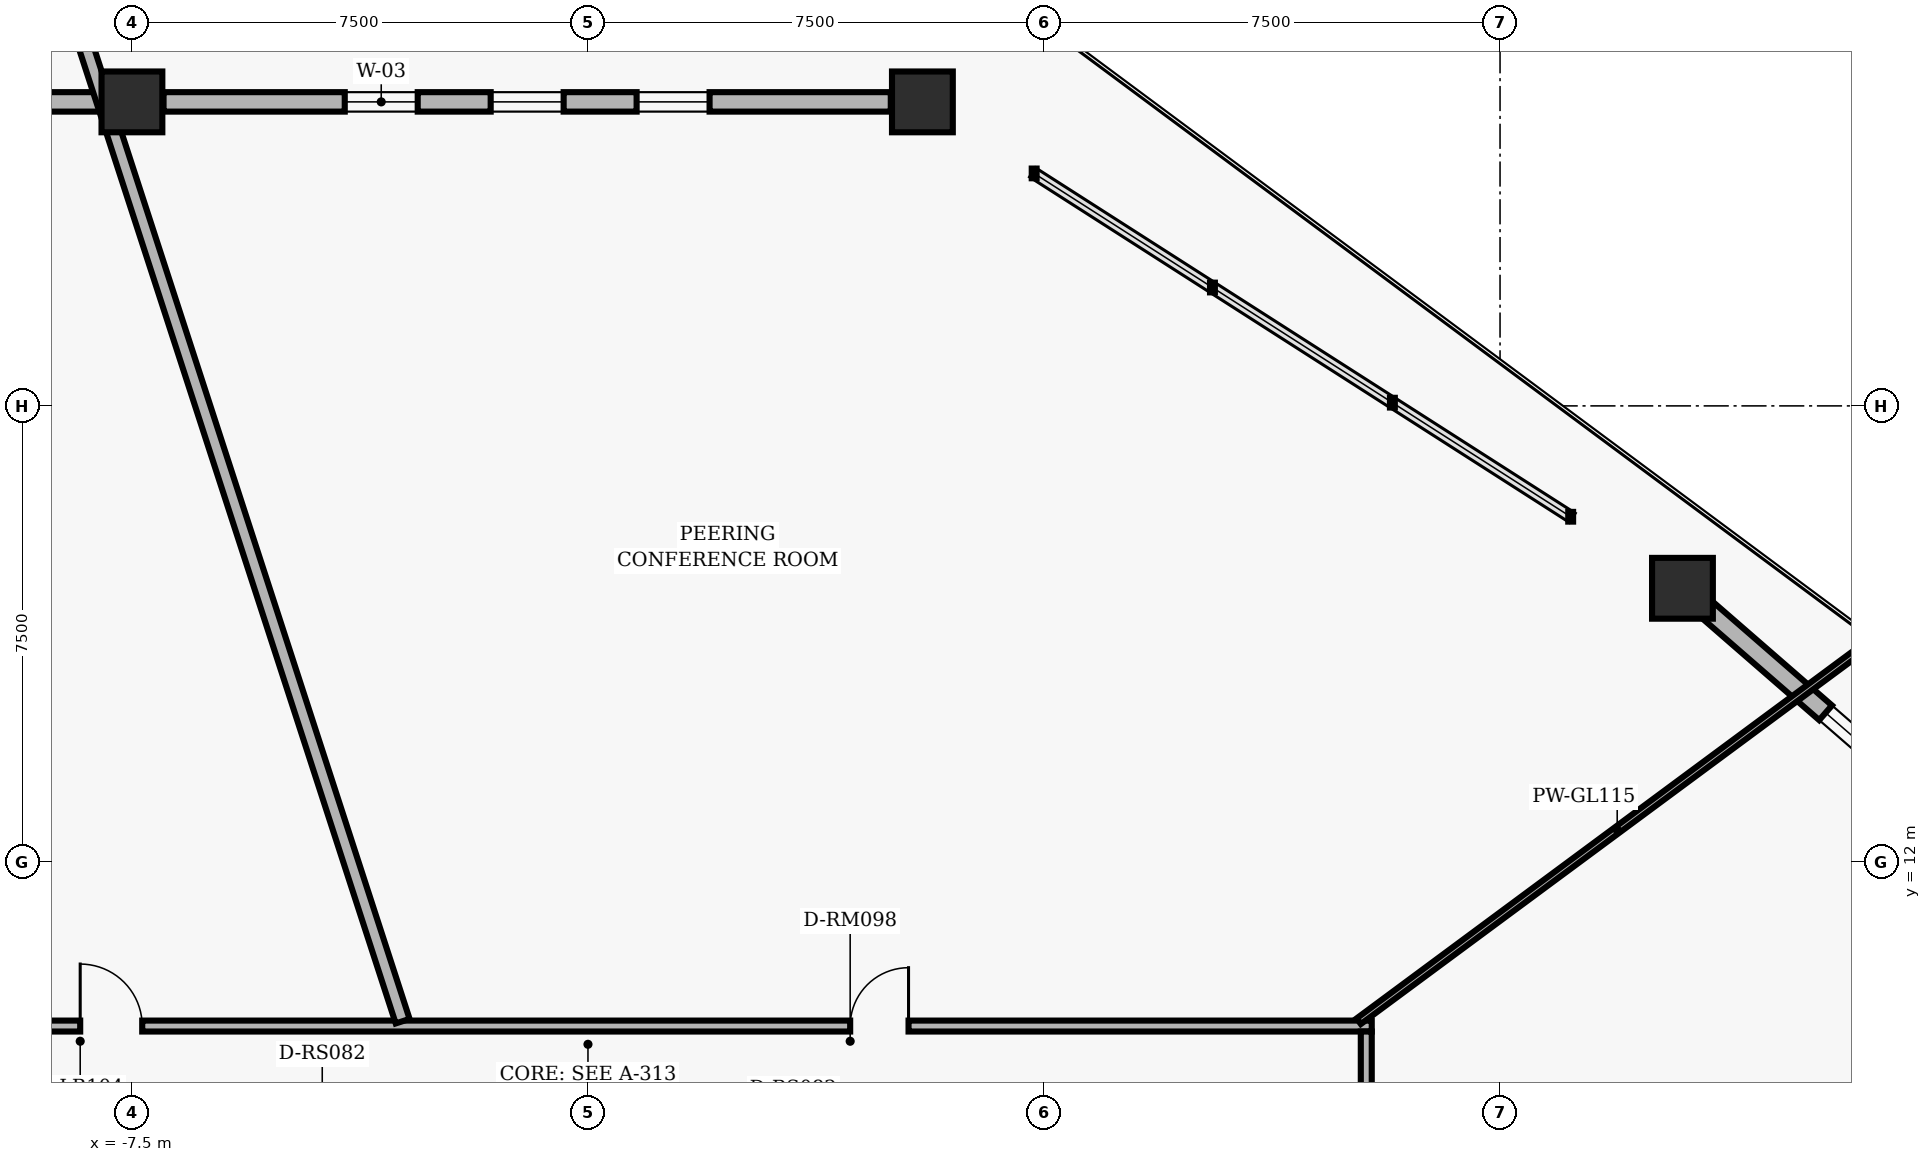
"""IFC4 building model, lengths in metres.
Left out: names, types, materials, properties, quantities, classifications, styles, units other than length and angle.
Written with IfcOpenShell. Run it as: python <this file> out.ifc"""

import sys

from ifc_helpers import new_model, si_unit, direction, frame, frame_2d, origin, origin_2d, place, context, subcontext, project, spatial, rectangle, extrude, element, fill, save


model = new_model("IFC4")
c1 = context("Model", 3, precision=1e-05, world=origin(), true_north=direction((0.0, 1.0)))
c2 = subcontext(c1, "Body", "Model", "MODEL_VIEW")
j1 = project(units=[si_unit("LENGTHUNIT", "METRE"), si_unit("PLANEANGLEUNIT", "RADIAN")], contexts=[c1])
p1 = place(None, origin())
s1 = spatial("IfcSite", under=j1, at=p1, CompositionType="ELEMENT")
p2 = place(p1, origin())
s2 = spatial("IfcBuilding", under=s1, at=p2, CompositionType="ELEMENT")
p3 = place(p2, frame((0.0, 0.0, 11.84)))
s3 = spatial("IfcBuildingStorey", under=s2, at=p3, CompositionType="ELEMENT", Elevation=11.84)
for number, where, z_axis, x_axis in (
    (1, (18.0, 16.5, 0.0), (0.0, 0.0, 1.0), (1.0, 0.0, 0.0)),
    (2, (5.5, 24.5, 0.0), (0.0, 0.0, 1.0), (1.0, 0.0, 0.0)),
    (3, (-7.5, 24.5, 0.0), (0.0, 0.0, 1.0), (1.0, 0.0, 0.0)),
):
    element("IfcColumn", number, at=place(p3, frame(where, z_axis=z_axis, x_axis=x_axis)), inside=s3, PredefinedType="COLUMN", context=c2, shape_type="SweptSolid", body=[
        extrude(rectangle(XDim=1.0, YDim=1.0, at=origin_2d()), origin(), (0.0, 0.0, 1.0), 3.52),
    ])
p4 = place(p3, frame((18.392, 16.159, 0.0), z_axis=(0.0, 0.0, 1.0), x_axis=(0.754615886195, -0.656166796098, 0.0)))
e4 = element("IfcWall", 4, at=p4, inside=s3, PredefinedType="SOLIDWALL", context=c2, shape_type="SweptSolid", body=[
    extrude(rectangle(XDim=14.2, YDim=0.32, at=frame_2d((7.1, 0.0))), origin(), (0.0, 0.0, 1.0), 2.221),
])
p5 = place(p4, frame((2.6, 0.0, 0.4)))
e5 = element("IfcOpeningElement", 5, at=p5, cuts=e4, PredefinedType="OPENING", context=c2, shape_type="SweptSolid", body=[
    extrude(rectangle(XDim=2.2, YDim=1.1, at=frame_2d((1.1, 0.55))), frame((0.0, 0.17, 0.0), z_axis=(0.0, -1.0, 0.0), x_axis=(1.0, 0.0, 0.0)), (0.0, 0.0, 1.0), 0.34),
])
p6 = place(p4, frame((6.0, 0.0, 0.4)))
e6 = element("IfcOpeningElement", 6, at=p6, cuts=e4, PredefinedType="OPENING", context=c2, shape_type="SweptSolid", body=[
    extrude(rectangle(XDim=2.2, YDim=1.1, at=frame_2d((1.1, 0.55))), frame((0.0, 0.17, 0.0), z_axis=(0.0, -1.0, 0.0), x_axis=(1.0, 0.0, 0.0)), (0.0, 0.0, 1.0), 0.34),
])
p7 = place(p4, frame((9.4, 0.0, 0.4)))
e7 = element("IfcOpeningElement", 7, at=p7, cuts=e4, PredefinedType="OPENING", context=c2, shape_type="SweptSolid", body=[
    extrude(rectangle(XDim=2.2, YDim=1.1, at=frame_2d((1.1, 0.55))), frame((0.0, 0.17, 0.0), z_axis=(0.0, -1.0, 0.0), x_axis=(1.0, 0.0, 0.0)), (0.0, 0.0, 1.0), 0.34),
])
p8 = place(p3, frame((-6.98, 24.5, 0.0), z_axis=(0.0, 0.0, 1.0), x_axis=(1.0, 0.0, 0.0)))
e8 = element("IfcWall", 8, at=p8, inside=s3, PredefinedType="SOLIDWALL", context=c2, shape_type="SweptSolid", body=[
    extrude(rectangle(XDim=11.96, YDim=0.32, at=frame_2d((5.98, 0.0))), origin(), (0.0, 0.0, 1.0), 2.548),
])
p9 = place(p8, frame((2.98, 0.0, 0.65)))
e9 = element("IfcOpeningElement", 9, at=p9, cuts=e8, PredefinedType="OPENING", context=c2, shape_type="SweptSolid", body=[
    extrude(rectangle(XDim=1.2, YDim=1.6, at=frame_2d((0.6, 0.8))), frame((0.0, 0.17, 0.0), z_axis=(0.0, -1.0, 0.0), x_axis=(1.0, 0.0, 0.0)), (0.0, 0.0, 1.0), 0.34),
])
p10 = place(p8, frame((5.38, 0.0, 0.65)))
e10 = element("IfcOpeningElement", 10, at=p10, cuts=e8, PredefinedType="OPENING", context=c2, shape_type="SweptSolid", body=[
    extrude(rectangle(XDim=1.2, YDim=1.6, at=frame_2d((0.6, 0.8))), frame((0.0, 0.17, 0.0), z_axis=(0.0, -1.0, 0.0), x_axis=(1.0, 0.0, 0.0)), (0.0, 0.0, 1.0), 0.34),
])
p11 = place(p8, frame((7.78, 0.0, 0.65)))
e11 = element("IfcOpeningElement", 11, at=p11, cuts=e8, PredefinedType="OPENING", context=c2, shape_type="SweptSolid", body=[
    extrude(rectangle(XDim=1.2, YDim=1.6, at=frame_2d((0.6, 0.8))), frame((0.0, 0.17, 0.0), z_axis=(0.0, -1.0, 0.0), x_axis=(1.0, 0.0, 0.0)), (0.0, 0.0, 1.0), 0.34),
])
p12 = place(p3, frame((-20.98, 24.5, 0.0), z_axis=(0.0, 0.0, 1.0), x_axis=(1.0, 0.0, 0.0)))
e12 = element("IfcWall", 12, at=p12, inside=s3, PredefinedType="SOLIDWALL", context=c2, shape_type="SweptSolid", body=[
    extrude(rectangle(XDim=12.96, YDim=0.32, at=frame_2d((6.48, 0.0))), origin(), (0.0, 0.0, 1.0), 2.548),
])
p13 = place(p3, frame((-12.89, 9.3, 0.0), z_axis=(0.0, 0.0, 1.0), x_axis=(1.0, 0.0, 0.0)))
e13 = element("IfcWall", 13, at=p13, inside=s3, PredefinedType="PARTITIONING", context=c2, shape_type="SweptSolid", body=[
    extrude(rectangle(XDim=25.78, YDim=0.18, at=frame_2d((12.89, 0.0))), origin(), (0.0, 0.0, 1.0), 2.72),
])
p14 = place(p13, frame((17.202, 0.0, 0.0)))
e14 = element("IfcOpeningElement", 14, at=p14, cuts=e13, PredefinedType="OPENING", context=c2, shape_type="SweptSolid", body=[
    extrude(rectangle(XDim=0.96, YDim=2.02, at=frame_2d((0.48, 1.01))), frame((0.0, 0.1, 0.0), z_axis=(0.0, -1.0, 0.0), x_axis=(1.0, 0.0, 0.0)), (0.0, 0.0, 1.0), 0.2),
])
p15 = place(p13, frame((4.539, 0.0, 0.0)))
e15 = element("IfcOpeningElement", 15, at=p15, cuts=e13, PredefinedType="OPENING", context=c2, shape_type="SweptSolid", body=[
    extrude(rectangle(XDim=1.02, YDim=2.02, at=frame_2d((0.51, 1.01))), frame((0.0, 0.1, 0.0), z_axis=(0.0, -1.0, 0.0), x_axis=(1.0, 0.0, 0.0)), (0.0, 0.0, 1.0), 0.2),
])
p16 = place(p3, frame((12.8, 9.21, 0.0), z_axis=(0.0, 0.0, 1.0), x_axis=(0.0, -1.0, 0.0)))
e16 = element("IfcWall", 16, at=p16, inside=s3, PredefinedType="PARTITIONING", context=c2, shape_type="SweptSolid", body=[
    extrude(rectangle(XDim=7.62, YDim=0.18, at=frame_2d((3.81, 0.0))), origin(), (0.0, 0.0, 1.0), 3.153),
])
p17 = place(p3, frame((12.676, 9.38, 0.0), z_axis=(0.0, 0.0, 1.0), x_axis=(0.803850730109, 0.594831071568, 0.0)))
e17 = element("IfcWall", 17, at=p17, inside=s3, PredefinedType="MOVABLE", context=c2, shape_type="SweptSolid", body=[
    extrude(rectangle(XDim=10.575, YDim=0.115, at=frame_2d((5.288, 0.0))), origin(), (0.0, 0.0, 1.0), 2.206),
])
p18 = place(p3, frame((-3.048, 9.38, 0.0), z_axis=(0.0, 0.0, 1.0), x_axis=(-0.309026872476, 0.951053306649, 0.0)))
e18 = element("IfcWall", 18, at=p18, inside=s3, PredefinedType="PARTITIONING", context=c2, shape_type="SweptSolid", body=[
    extrude(rectangle(XDim=18.464, YDim=0.24, at=frame_2d((9.232, 0.0))), origin(), (0.0, 0.0, 1.0), 2.206),
])
p19 = place(p5, origin())
e19 = element("IfcWindow", 19, at=p19, inside=s3, PartitioningType="SINGLE_PANEL", PredefinedType="WINDOW", context=c2, shape_type="SweptSolid", body=[
    extrude(rectangle(XDim=2.2, YDim=1.1, at=frame_2d((1.1, 0.55))), frame((0.0, 0.03, 0.0), z_axis=(0.0, -1.0, 0.0), x_axis=(1.0, 0.0, 0.0)), (0.0, 0.0, 1.0), 0.06),
])
fill(e5, e19)
p20 = place(p9, origin())
e20 = element("IfcWindow", 20, at=p20, inside=s3, PartitioningType="SINGLE_PANEL", PredefinedType="WINDOW", context=c2, shape_type="SweptSolid", body=[
    extrude(rectangle(XDim=1.2, YDim=1.6, at=frame_2d((0.6, 0.8))), frame((0.0, 0.03, 0.0), z_axis=(0.0, -1.0, 0.0), x_axis=(1.0, 0.0, 0.0)), (0.0, 0.0, 1.0), 0.06),
])
fill(e9, e20)
p21 = place(p10, origin())
e21 = element("IfcWindow", 21, at=p21, inside=s3, PartitioningType="SINGLE_PANEL", PredefinedType="WINDOW", context=c2, shape_type="SweptSolid", body=[
    extrude(rectangle(XDim=1.2, YDim=1.6, at=frame_2d((0.6, 0.8))), frame((0.0, 0.03, 0.0), z_axis=(0.0, -1.0, 0.0), x_axis=(1.0, 0.0, 0.0)), (0.0, 0.0, 1.0), 0.06),
])
fill(e10, e21)
p22 = place(p11, origin())
e22 = element("IfcWindow", 22, at=p22, inside=s3, PartitioningType="SINGLE_PANEL", PredefinedType="WINDOW", context=c2, shape_type="SweptSolid", body=[
    extrude(rectangle(XDim=1.2, YDim=1.6, at=frame_2d((0.6, 0.8))), frame((0.0, 0.03, 0.0), z_axis=(0.0, -1.0, 0.0), x_axis=(1.0, 0.0, 0.0)), (0.0, 0.0, 1.0), 0.06),
])
fill(e11, e22)
p23 = place(p14, origin())
e23 = element("IfcDoor", 23, at=p23, inside=s3, OperationType="SINGLE_SWING_RIGHT", PredefinedType="DOOR", context=c2, shape_type="SweptSolid", body=[
    extrude(rectangle(XDim=0.96, YDim=2.02, at=frame_2d((0.48, 1.01))), frame((0.0, 0.025, 0.0), z_axis=(0.0, -1.0, 0.0), x_axis=(1.0, 0.0, 0.0)), (0.0, 0.0, 1.0), 0.05),
])
fill(e14, e23)
p24 = place(p15, origin())
e24 = element("IfcDoor", 24, at=p24, inside=s3, OperationType="SINGLE_SWING_LEFT", PredefinedType="DOOR", context=c2, shape_type="SweptSolid", body=[
    extrude(rectangle(XDim=1.02, YDim=2.02, at=frame_2d((0.51, 1.01))), frame((0.0, 0.025, 0.0), z_axis=(0.0, -1.0, 0.0), x_axis=(1.0, 0.0, 0.0)), (0.0, 0.0, 1.0), 0.05),
])
fill(e15, e24)
save(model, sys.argv[1])
